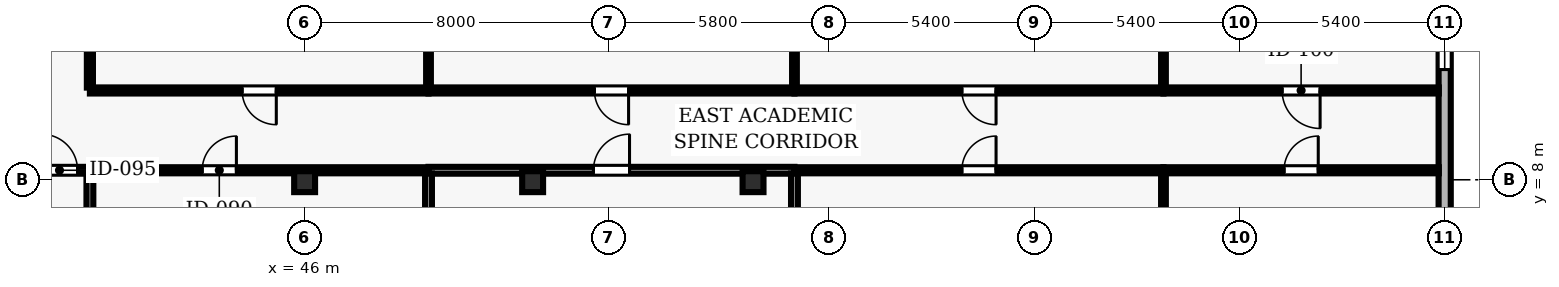
"""IFC4 building model, lengths in metres.
Left out: names, types, materials, properties, quantities, classifications, styles, units other than length and angle.
Written with IfcOpenShell. Run it as: python <this file> out.ifc"""

import sys

from ifc_helpers import new_model, si_unit, direction, frame, frame_2d, origin, origin_2d, place, context, subcontext, project, spatial, rectangle, hollow_rectangle, extrude, element, fill, save


model = new_model("IFC4")
c1 = context("Model", 3, precision=1e-05, world=origin(), true_north=direction((0.0, 1.0)))
c2 = subcontext(c1, "Body", "Model", "MODEL_VIEW")
j1 = project(units=[si_unit("LENGTHUNIT", "METRE"), si_unit("PLANEANGLEUNIT", "RADIAN")], contexts=[c1])
p1 = place(None, origin())
s1 = spatial("IfcSite", under=j1, at=p1, CompositionType="ELEMENT")
p2 = place(p1, origin())
s2 = spatial("IfcBuilding", under=s1, at=p2, CompositionType="ELEMENT")
p3 = place(p2, frame((0.0, 0.0, 50.5)))
s3 = spatial("IfcBuildingStorey", under=s2, at=p3, CompositionType="ELEMENT", Elevation=50.5)
for number, where, z_axis, x_axis in (
    (1, (46.0, 7.95, 0.0), (0.0, 0.0, 1.0), (1.0, 0.0, 0.0)),
    (2, (52.0, 7.95, 0.0), (0.0, 0.0, 1.0), (1.0, 0.0, 0.0)),
    (3, (57.8, 7.95, 0.0), (0.0, 0.0, 1.0), (1.0, 0.0, 0.0)),
):
    element("IfcColumn", number, at=place(p3, frame(where, z_axis=z_axis, x_axis=x_axis)), inside=s3, PredefinedType="COLUMN", context=c2, shape_type="SweptSolid", body=[
        extrude(hollow_rectangle(XDim=0.55, YDim=0.55, WallThickness=0.025, at=origin_2d()), origin(), (0.0, 0.0, 1.0), 3.9),
    ])
p4 = place(p3, frame((76.0, 2.5, 0.0), z_axis=(0.0, 0.0, 1.0), x_axis=(0.0, 1.0, 0.0)))
e4 = element("IfcWall", 4, at=p4, inside=s3, PredefinedType="SOLIDWALL", context=c2, shape_type="SweptSolid", body=[
    extrude(rectangle(XDim=11.0, YDim=0.32, at=frame_2d((5.5, 0.0))), origin(), (0.0, 0.0, 1.0), 3.69),
])
p5 = place(p4, frame((2.0, 0.0, 0.9)))
e5 = element("IfcOpeningElement", 5, at=p5, cuts=e4, PredefinedType="OPENING", context=c2, shape_type="SweptSolid", body=[
    extrude(rectangle(XDim=1.5, YDim=1.6, at=frame_2d((0.75, 0.8))), frame((0.0, 0.17, 0.0), z_axis=(0.0, -1.0, 0.0), x_axis=(1.0, 0.0, 0.0)), (0.0, 0.0, 1.0), 0.34),
])
p6 = place(p4, frame((8.4, 0.0, 0.9)))
e6 = element("IfcOpeningElement", 6, at=p6, cuts=e4, PredefinedType="OPENING", context=c2, shape_type="SweptSolid", body=[
    extrude(rectangle(XDim=1.5, YDim=1.6, at=frame_2d((0.75, 0.8))), frame((0.0, 0.17, 0.0), z_axis=(0.0, -1.0, 0.0), x_axis=(1.0, 0.0, 0.0)), (0.0, 0.0, 1.0), 0.34),
])
p7 = place(p3, frame((38.05, 8.25, 0.0), z_axis=(0.0, 0.0, 1.0), x_axis=(1.0, 0.0, 0.0)))
e7 = element("IfcWall", 7, at=p7, inside=s3, PredefinedType="PARTITIONING", context=c2, shape_type="SweptSolid", body=[
    extrude(rectangle(XDim=2.3, YDim=0.18, at=frame_2d((1.15, 0.0))), origin(), (0.0, 0.0, 1.0), 3.055),
])
p8 = place(p7, frame((1.025, 0.0, 0.0)))
e8 = element("IfcOpeningElement", 8, at=p8, cuts=e7, PredefinedType="OPENING", context=c2, shape_type="SweptSolid", body=[
    extrude(rectangle(XDim=0.95, YDim=2.1, at=frame_2d((0.475, 1.05))), frame((0.0, 0.1, 0.0), z_axis=(0.0, -1.0, 0.0), x_axis=(1.0, 0.0, 0.0)), (0.0, 0.0, 1.0), 0.2),
])
p9 = place(p3, frame((40.35, 8.25, 0.0), z_axis=(0.0, 0.0, 1.0), x_axis=(1.0, 0.0, 0.0)))
e9 = element("IfcWall", 9, at=p9, inside=s3, PredefinedType="PARTITIONING", context=c2, shape_type="SweptSolid", body=[
    extrude(rectangle(XDim=8.91, YDim=0.16, at=frame_2d((4.455, 0.0))), origin(), (0.0, 0.0, 1.0), 3.055),
])
p10 = place(p9, frame((2.955, 0.0, 0.0)))
e10 = element("IfcOpeningElement", 10, at=p10, cuts=e9, PredefinedType="OPENING", context=c2, shape_type="SweptSolid", body=[
    extrude(rectangle(XDim=0.9, YDim=2.1, at=frame_2d((0.45, 1.05))), frame((0.0, 0.09, 0.0), z_axis=(0.0, -1.0, 0.0), x_axis=(1.0, 0.0, 0.0)), (0.0, 0.0, 1.0), 0.18),
])
p11 = place(p3, frame((49.26, 8.25, 0.0), z_axis=(0.0, 0.0, 1.0), x_axis=(1.0, 0.0, 0.0)))
e11 = element("IfcWall", 11, at=p11, inside=s3, PredefinedType="PARTITIONING", context=c2, shape_type="SweptSolid", body=[
    extrude(rectangle(XDim=9.63, YDim=0.18, at=frame_2d((4.815, 0.0))), origin(), (0.0, 0.0, 1.0), 3.055),
])
p12 = place(p11, frame((4.34, 0.0, 0.0)))
e12 = element("IfcOpeningElement", 12, at=p12, cuts=e11, PredefinedType="OPENING", context=c2, shape_type="SweptSolid", body=[
    extrude(rectangle(XDim=0.95, YDim=2.1, at=frame_2d((0.475, 1.05))), frame((0.0, 0.1, 0.0), z_axis=(0.0, -1.0, 0.0), x_axis=(1.0, 0.0, 0.0)), (0.0, 0.0, 1.0), 0.2),
])
p13 = place(p3, frame((49.26, 10.35, 0.0), z_axis=(0.0, 0.0, 1.0), x_axis=(-1.0, 0.0, 0.0)))
e13 = element("IfcWall", 13, at=p13, inside=s3, PredefinedType="PARTITIONING", context=c2, shape_type="SweptSolid", body=[
    extrude(rectangle(XDim=8.91, YDim=0.16, at=frame_2d((4.455, 0.0))), origin(), (0.0, 0.0, 1.0), 3.277),
])
p14 = place(p13, frame((4.005, 0.0, 0.0)))
e14 = element("IfcOpeningElement", 14, at=p14, cuts=e13, PredefinedType="OPENING", context=c2, shape_type="SweptSolid", body=[
    extrude(rectangle(XDim=0.9, YDim=2.1, at=frame_2d((0.45, 1.05))), frame((0.0, 0.09, 0.0), z_axis=(0.0, -1.0, 0.0), x_axis=(1.0, 0.0, 0.0)), (0.0, 0.0, 1.0), 0.18),
])
p15 = place(p3, frame((58.89, 8.25, 0.0), z_axis=(0.0, 0.0, 1.0), x_axis=(1.0, 0.0, 0.0)))
e15 = element("IfcWall", 15, at=p15, inside=s3, PredefinedType="PARTITIONING", context=c2, shape_type="SweptSolid", body=[
    extrude(rectangle(XDim=9.71, YDim=0.16, at=frame_2d((4.855, 0.0))), origin(), (0.0, 0.0, 1.0), 3.69),
])
p16 = place(p15, frame((4.405, 0.0, 0.0)))
e16 = element("IfcOpeningElement", 16, at=p16, cuts=e15, PredefinedType="OPENING", context=c2, shape_type="SweptSolid", body=[
    extrude(rectangle(XDim=0.9, YDim=2.1, at=frame_2d((0.45, 1.05))), frame((0.0, 0.09, 0.0), z_axis=(0.0, -1.0, 0.0), x_axis=(1.0, 0.0, 0.0)), (0.0, 0.0, 1.0), 0.18),
])
p17 = place(p3, frame((58.89, 10.35, 0.0), z_axis=(0.0, 0.0, 1.0), x_axis=(-1.0, 0.0, 0.0)))
e17 = element("IfcWall", 17, at=p17, inside=s3, PredefinedType="PARTITIONING", context=c2, shape_type="SweptSolid", body=[
    extrude(rectangle(XDim=9.63, YDim=0.16, at=frame_2d((4.815, 0.0))), origin(), (0.0, 0.0, 1.0), 3.277),
])
p18 = place(p17, frame((4.365, 0.0, 0.0)))
e18 = element("IfcOpeningElement", 18, at=p18, cuts=e17, PredefinedType="OPENING", context=c2, shape_type="SweptSolid", body=[
    extrude(rectangle(XDim=0.9, YDim=2.1, at=frame_2d((0.45, 1.05))), frame((0.0, 0.09, 0.0), z_axis=(0.0, -1.0, 0.0), x_axis=(1.0, 0.0, 0.0)), (0.0, 0.0, 1.0), 0.18),
])
p19 = place(p3, frame((68.6, 8.25, 0.0), z_axis=(0.0, 0.0, 1.0), x_axis=(1.0, 0.0, 0.0)))
e19 = element("IfcWall", 19, at=p19, inside=s3, PredefinedType="PARTITIONING", context=c2, shape_type="SweptSolid", body=[
    extrude(rectangle(XDim=7.245, YDim=0.16, at=frame_2d((3.623, 0.0))), origin(), (0.0, 0.0, 1.0), 3.69),
])
p20 = place(p19, frame((3.173, 0.0, 0.0)))
e20 = element("IfcOpeningElement", 20, at=p20, cuts=e19, PredefinedType="OPENING", context=c2, shape_type="SweptSolid", body=[
    extrude(rectangle(XDim=0.9, YDim=2.1, at=frame_2d((0.45, 1.05))), frame((0.0, 0.09, 0.0), z_axis=(0.0, -1.0, 0.0), x_axis=(1.0, 0.0, 0.0)), (0.0, 0.0, 1.0), 0.18),
])
p21 = place(p3, frame((68.6, 10.35, 0.0), z_axis=(0.0, 0.0, 1.0), x_axis=(-1.0, 0.0, 0.0)))
e21 = element("IfcWall", 21, at=p21, inside=s3, PredefinedType="PARTITIONING", context=c2, shape_type="SweptSolid", body=[
    extrude(rectangle(XDim=9.71, YDim=0.16, at=frame_2d((4.855, 0.0))), origin(), (0.0, 0.0, 1.0), 3.277),
])
p22 = place(p21, frame((4.405, 0.0, 0.0)))
e22 = element("IfcOpeningElement", 22, at=p22, cuts=e21, PredefinedType="OPENING", context=c2, shape_type="SweptSolid", body=[
    extrude(rectangle(XDim=0.9, YDim=2.1, at=frame_2d((0.45, 1.05))), frame((0.0, 0.09, 0.0), z_axis=(0.0, -1.0, 0.0), x_axis=(1.0, 0.0, 0.0)), (0.0, 0.0, 1.0), 0.18),
])
p23 = place(p3, frame((75.845, 10.35, 0.0), z_axis=(0.0, 0.0, 1.0), x_axis=(-1.0, 0.0, 0.0)))
e23 = element("IfcWall", 23, at=p23, inside=s3, PredefinedType="PARTITIONING", context=c2, shape_type="SweptSolid", body=[
    extrude(rectangle(XDim=7.245, YDim=0.16, at=frame_2d((3.623, 0.0))), origin(), (0.0, 0.0, 1.0), 3.69),
])
p24 = place(p23, frame((3.123, 0.0, 0.0)))
e24 = element("IfcOpeningElement", 24, at=p24, cuts=e23, PredefinedType="OPENING", context=c2, shape_type="SweptSolid", body=[
    extrude(rectangle(XDim=1.0, YDim=2.1, at=frame_2d((0.5, 1.05))), frame((0.0, 0.09, 0.0), z_axis=(0.0, -1.0, 0.0), x_axis=(1.0, 0.0, 0.0)), (0.0, 0.0, 1.0), 0.18),
])
p25 = place(p3, frame((40.35, 0.155, 0.0), z_axis=(0.0, 0.0, 1.0), x_axis=(0.0, 1.0, 0.0)))
e25 = element("IfcWall", 25, at=p25, inside=s3, PredefinedType="PARTITIONING", context=c2, shape_type="SweptSolid", body=[
    extrude(rectangle(XDim=8.01, YDim=0.18, at=frame_2d((4.005, 0.0))), origin(), (0.0, 0.0, 1.0), 3.69),
])
p26 = place(p3, frame((40.35, 10.425, 0.0), z_axis=(0.0, 0.0, 1.0), x_axis=(0.0, 1.0, 0.0)))
e26 = element("IfcWall", 26, at=p26, inside=s3, PredefinedType="PARTITIONING", context=c2, shape_type="SweptSolid", body=[
    extrude(rectangle(XDim=5.5, YDim=0.16, at=frame_2d((2.75, 0.0))), origin(), (0.0, 0.0, 1.0), 3.277),
])
p27 = place(p3, frame((49.26, 0.155, 0.0), z_axis=(0.0, 0.0, 1.0), x_axis=(0.0, 1.0, 0.0)))
e27 = element("IfcWall", 27, at=p27, inside=s3, PredefinedType="PARTITIONING", context=c2, shape_type="SweptSolid", body=[
    extrude(rectangle(XDim=8.01, YDim=0.18, at=frame_2d((4.005, 0.0))), origin(), (0.0, 0.0, 1.0), 3.69),
])
p28 = place(p3, frame((49.26, 10.425, 0.0), z_axis=(0.0, 0.0, 1.0), x_axis=(0.0, 1.0, 0.0)))
e28 = element("IfcWall", 28, at=p28, inside=s3, PredefinedType="PARTITIONING", context=c2, shape_type="SweptSolid", body=[
    extrude(rectangle(XDim=5.518, YDim=0.125, at=frame_2d((2.759, 0.0))), origin(), (0.0, 0.0, 1.0), 3.69),
])
p29 = place(p3, frame((58.89, 0.155, 0.0), z_axis=(0.0, 0.0, 1.0), x_axis=(0.0, 1.0, 0.0)))
e29 = element("IfcWall", 29, at=p29, inside=s3, PredefinedType="PARTITIONING", context=c2, shape_type="SweptSolid", body=[
    extrude(rectangle(XDim=8.01, YDim=0.18, at=frame_2d((4.005, 0.0))), origin(), (0.0, 0.0, 1.0), 3.69),
])
p30 = place(p3, frame((58.89, 10.425, 0.0), z_axis=(0.0, 0.0, 1.0), x_axis=(0.0, 1.0, 0.0)))
e30 = element("IfcWall", 30, at=p30, inside=s3, PredefinedType="PARTITIONING", context=c2, shape_type="SweptSolid", body=[
    extrude(rectangle(XDim=5.42, YDim=0.125, at=frame_2d((2.71, 0.0))), origin(), (0.0, 0.0, 1.0), 3.69),
])
p31 = place(p3, frame((68.6, 0.155, 0.0), z_axis=(0.0, 0.0, 1.0), x_axis=(0.0, 1.0, 0.0)))
e31 = element("IfcWall", 31, at=p31, inside=s3, PredefinedType="PARTITIONING", context=c2, shape_type="SweptSolid", body=[
    extrude(rectangle(XDim=8.02, YDim=0.125, at=frame_2d((4.01, 0.0))), origin(), (0.0, 0.0, 1.0), 3.055),
])
p32 = place(p3, frame((68.6, 10.425, 0.0), z_axis=(0.0, 0.0, 1.0), x_axis=(0.0, 1.0, 0.0)))
e32 = element("IfcWall", 32, at=p32, inside=s3, PredefinedType="PARTITIONING", context=c2, shape_type="SweptSolid", body=[
    extrude(rectangle(XDim=5.42, YDim=0.125, at=frame_2d((2.71, 0.0))), origin(), (0.0, 0.0, 1.0), 3.055),
])
p33 = place(p6, origin())
e33 = element("IfcWindow", 33, at=p33, inside=s3, PartitioningType="SINGLE_PANEL", PredefinedType="WINDOW", context=c2, shape_type="SweptSolid", body=[
    extrude(rectangle(XDim=1.5, YDim=1.6, at=frame_2d((0.75, 0.8))), frame((0.0, 0.03, 0.0), z_axis=(0.0, -1.0, 0.0), x_axis=(1.0, 0.0, 0.0)), (0.0, 0.0, 1.0), 0.06),
])
fill(e6, e33)
p34 = place(p8, origin())
e34 = element("IfcDoor", 34, at=p34, inside=s3, OperationType="SINGLE_SWING_LEFT", PredefinedType="DOOR", context=c2, shape_type="SweptSolid", body=[
    extrude(rectangle(XDim=0.95, YDim=2.1, at=frame_2d((0.475, 1.05))), frame((0.0, 0.025, 0.0), z_axis=(0.0, -1.0, 0.0), x_axis=(1.0, 0.0, 0.0)), (0.0, 0.0, 1.0), 0.05),
])
fill(e8, e34)
p35 = place(p10, origin())
e35 = element("IfcDoor", 35, at=p35, inside=s3, OperationType="SINGLE_SWING_RIGHT", PredefinedType="DOOR", context=c2, shape_type="SweptSolid", body=[
    extrude(rectangle(XDim=0.9, YDim=2.1, at=frame_2d((0.45, 1.05))), frame((0.0, 0.025, 0.0), z_axis=(0.0, -1.0, 0.0), x_axis=(1.0, 0.0, 0.0)), (0.0, 0.0, 1.0), 0.05),
])
fill(e10, e35)
p36 = place(p14, origin())
e36 = element("IfcDoor", 36, at=p36, inside=s3, OperationType="SINGLE_SWING_LEFT", PredefinedType="DOOR", context=c2, shape_type="SweptSolid", body=[
    extrude(rectangle(XDim=0.9, YDim=2.1, at=frame_2d((0.45, 1.05))), frame((0.0, 0.025, 0.0), z_axis=(0.0, -1.0, 0.0), x_axis=(1.0, 0.0, 0.0)), (0.0, 0.0, 1.0), 0.05),
])
fill(e14, e36)
p37 = place(p12, origin())
e37 = element("IfcDoor", 37, at=p37, inside=s3, OperationType="SINGLE_SWING_RIGHT", PredefinedType="DOOR", context=c2, shape_type="SweptSolid", body=[
    extrude(rectangle(XDim=0.95, YDim=2.1, at=frame_2d((0.475, 1.05))), frame((0.0, 0.025, 0.0), z_axis=(0.0, -1.0, 0.0), x_axis=(1.0, 0.0, 0.0)), (0.0, 0.0, 1.0), 0.05),
])
fill(e12, e37)
p38 = place(p18, origin())
e38 = element("IfcDoor", 38, at=p38, inside=s3, OperationType="SINGLE_SWING_LEFT", PredefinedType="DOOR", context=c2, shape_type="SweptSolid", body=[
    extrude(rectangle(XDim=0.9, YDim=2.1, at=frame_2d((0.45, 1.05))), frame((0.0, 0.025, 0.0), z_axis=(0.0, -1.0, 0.0), x_axis=(1.0, 0.0, 0.0)), (0.0, 0.0, 1.0), 0.05),
])
fill(e18, e38)
p39 = place(p16, origin())
e39 = element("IfcDoor", 39, at=p39, inside=s3, OperationType="SINGLE_SWING_RIGHT", PredefinedType="DOOR", context=c2, shape_type="SweptSolid", body=[
    extrude(rectangle(XDim=0.9, YDim=2.1, at=frame_2d((0.45, 1.05))), frame((0.0, 0.025, 0.0), z_axis=(0.0, -1.0, 0.0), x_axis=(1.0, 0.0, 0.0)), (0.0, 0.0, 1.0), 0.05),
])
fill(e16, e39)
p40 = place(p22, origin())
e40 = element("IfcDoor", 40, at=p40, inside=s3, OperationType="SINGLE_SWING_LEFT", PredefinedType="DOOR", context=c2, shape_type="SweptSolid", body=[
    extrude(rectangle(XDim=0.9, YDim=2.1, at=frame_2d((0.45, 1.05))), frame((0.0, 0.025, 0.0), z_axis=(0.0, -1.0, 0.0), x_axis=(1.0, 0.0, 0.0)), (0.0, 0.0, 1.0), 0.05),
])
fill(e22, e40)
p41 = place(p20, origin())
e41 = element("IfcDoor", 41, at=p41, inside=s3, OperationType="SINGLE_SWING_RIGHT", PredefinedType="DOOR", context=c2, shape_type="SweptSolid", body=[
    extrude(rectangle(XDim=0.9, YDim=2.1, at=frame_2d((0.45, 1.05))), frame((0.0, 0.025, 0.0), z_axis=(0.0, -1.0, 0.0), x_axis=(1.0, 0.0, 0.0)), (0.0, 0.0, 1.0), 0.05),
])
fill(e20, e41)
p42 = place(p24, origin())
e42 = element("IfcDoor", 42, at=p42, inside=s3, OperationType="SINGLE_SWING_LEFT", PredefinedType="DOOR", context=c2, shape_type="SweptSolid", body=[
    extrude(rectangle(XDim=1.0, YDim=2.1, at=frame_2d((0.5, 1.05))), frame((0.0, 0.025, 0.0), z_axis=(0.0, -1.0, 0.0), x_axis=(1.0, 0.0, 0.0)), (0.0, 0.0, 1.0), 0.05),
])
fill(e24, e42)
save(model, sys.argv[1])
